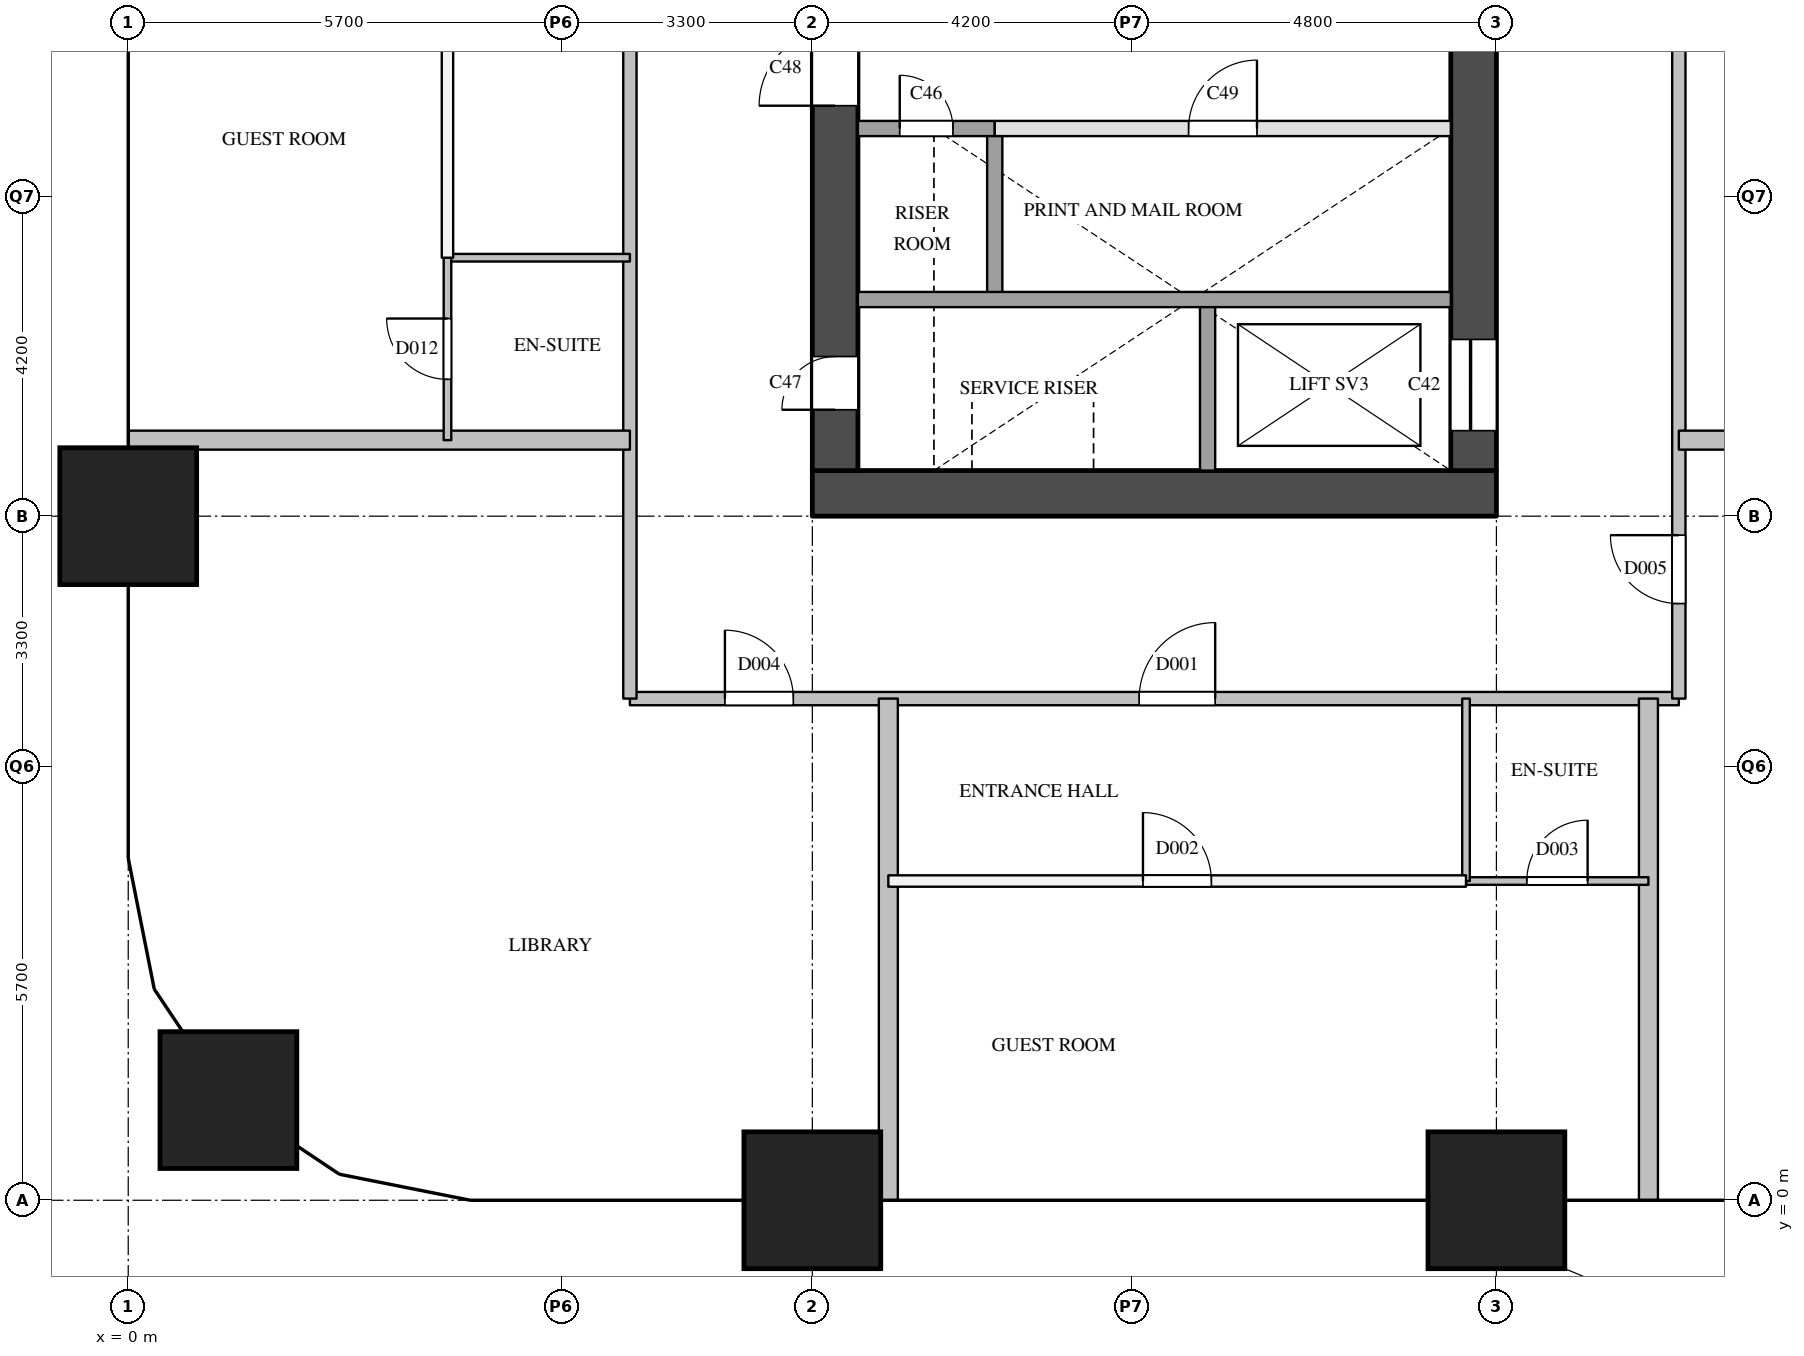
"""IFC4 building model, lengths in metres.
Left out: names, types, materials, properties, quantities, classifications, styles, units other than length and angle.
Written with IfcOpenShell. Run it as: python <this file> out.ifc"""

import sys

from ifc_helpers import new_model, si_unit, direction, frame, frame_2d, origin, origin_2d, place, context, subcontext, project, spatial, rectangle, extrude, element, fill, save


model = new_model("IFC4")
c1 = context("Model", 3, precision=1e-05, world=origin(), true_north=direction((0.0, 1.0)))
c2 = subcontext(c1, "Body", "Model", "MODEL_VIEW")
j1 = project(units=[si_unit("LENGTHUNIT", "METRE"), si_unit("PLANEANGLEUNIT", "RADIAN")], contexts=[c1])
p1 = place(None, origin())
s1 = spatial("IfcSite", under=j1, at=p1, CompositionType="ELEMENT")
p2 = place(p1, origin())
s2 = spatial("IfcBuilding", under=s1, at=p2, CompositionType="ELEMENT")
p3 = place(p2, frame((0.0, 0.0, 50.0)))
s3 = spatial("IfcBuildingStorey", under=s2, at=p3, CompositionType="ELEMENT", Elevation=50.0)
for number, where, z_axis, x_axis in (
    (1, (1.318, 1.318, 0.0), (0.0, 0.0, 1.0), (1.0, 0.0, 0.0)),
    (2, (0.0, 9.0, 0.0), (0.0, 0.0, 1.0), (1.0, 0.0, 0.0)),
    (3, (9.0, 0.0, 0.0), (0.0, 0.0, 1.0), (1.0, 0.0, 0.0)),
    (4, (18.0, 0.0, 0.0), (0.0, 0.0, 1.0), (1.0, 0.0, 0.0)),
):
    element("IfcColumn", number, at=place(p3, frame(where, z_axis=z_axis, x_axis=x_axis)), inside=s3, PredefinedType="COLUMN", context=c2, shape_type="SweptSolid", body=[
        extrude(rectangle(XDim=1.8, YDim=1.8, at=origin_2d()), origin(), (0.0, 0.0, 1.0), 3.8),
    ])
p4 = place(p3, frame((9.0, 9.3, 0.0), z_axis=(0.0, 0.0, 1.0), x_axis=(1.0, 0.0, 0.0)))
e5 = element("IfcWall", 5, at=p4, inside=s3, PredefinedType="SHEAR", context=c2, shape_type="SweptSolid", body=[
    extrude(rectangle(XDim=9.0, YDim=0.6, at=frame_2d((4.5, 0.0))), origin(), (0.0, 0.0, 1.0), 3.5),
])
p5 = place(p3, frame((9.3, 9.6, 0.0), z_axis=(0.0, 0.0, 1.0), x_axis=(0.0, 1.0, 0.0)))
e6 = element("IfcWall", 6, at=p5, inside=s3, PredefinedType="SHEAR", context=c2, shape_type="SweptSolid", body=[
    extrude(rectangle(XDim=12.3, YDim=0.6, at=frame_2d((6.15, 0.0))), origin(), (0.0, 0.0, 1.0), 3.5),
])
p6 = place(p5, frame((0.8, 0.0, 0.0)))
e7 = element("IfcOpeningElement", 7, at=p6, cuts=e6, PredefinedType="OPENING", context=c2, shape_type="SweptSolid", body=[
    extrude(rectangle(XDim=0.7, YDim=2.1, at=frame_2d((0.35, 1.05))), frame((0.0, 0.31, 0.0), z_axis=(0.0, -1.0, 0.0), x_axis=(1.0, 0.0, 0.0)), (0.0, 0.0, 1.0), 0.62),
])
p7 = place(p5, frame((4.8, 0.0, 0.0)))
e8 = element("IfcOpeningElement", 8, at=p7, cuts=e6, PredefinedType="OPENING", context=c2, shape_type="SweptSolid", body=[
    extrude(rectangle(XDim=1.0, YDim=2.1, at=frame_2d((0.5, 1.05))), frame((0.0, 0.31, 0.0), z_axis=(0.0, -1.0, 0.0), x_axis=(1.0, 0.0, 0.0)), (0.0, 0.0, 1.0), 0.62),
])
p8 = place(p3, frame((17.7, 9.6, 0.0), z_axis=(0.0, 0.0, 1.0), x_axis=(0.0, 1.0, 0.0)))
e9 = element("IfcWall", 9, at=p8, inside=s3, PredefinedType="SHEAR", context=c2, shape_type="SweptSolid", body=[
    extrude(rectangle(XDim=12.3, YDim=0.6, at=frame_2d((6.15, 0.0))), origin(), (0.0, 0.0, 1.0), 3.5),
])
p9 = place(p8, frame((0.525, 0.0, 0.0)))
e10 = element("IfcOpeningElement", 10, at=p9, cuts=e9, PredefinedType="OPENING", context=c2, shape_type="SweptSolid", body=[
    extrude(rectangle(XDim=1.2, YDim=2.1, at=frame_2d((0.6, 1.05))), frame((0.0, 0.31, 0.0), z_axis=(0.0, -1.0, 0.0), x_axis=(1.0, 0.0, 0.0)), (0.0, 0.0, 1.0), 0.62),
])
p10 = place(p3, frame((11.4, 11.9, 0.0), z_axis=(0.0, 0.0, 1.0), x_axis=(0.0, 1.0, 0.0)))
e11 = element("IfcWall", 11, at=p10, inside=s3, PredefinedType="SOLIDWALL", context=c2, shape_type="SweptSolid", body=[
    extrude(rectangle(XDim=2.2, YDim=0.2, at=frame_2d((1.1, 0.0))), origin(), (0.0, 0.0, 1.0), 3.5),
])
p11 = place(p3, frame((14.2, 9.6, 0.0), z_axis=(0.0, 0.0, 1.0), x_axis=(0.0, 1.0, 0.0)))
e12 = element("IfcWall", 12, at=p11, inside=s3, PredefinedType="SOLIDWALL", context=c2, shape_type="SweptSolid", body=[
    extrude(rectangle(XDim=2.3, YDim=0.2, at=frame_2d((1.15, 0.0))), origin(), (0.0, 0.0, 1.0), 3.5),
])
p12 = place(p3, frame((9.6, 11.85, 0.0), z_axis=(0.0, 0.0, 1.0), x_axis=(1.0, 0.0, 0.0)))
e13 = element("IfcWall", 13, at=p12, inside=s3, PredefinedType="SOLIDWALL", context=c2, shape_type="SweptSolid", body=[
    extrude(rectangle(XDim=7.8, YDim=0.2, at=frame_2d((3.9, 0.0))), origin(), (0.0, 0.0, 1.0), 3.5),
])
p13 = place(p3, frame((11.4, 14.1, 0.0), z_axis=(0.0, 0.0, 1.0), x_axis=(1.0, 0.0, 0.0)))
e14 = element("IfcWall", 14, at=p13, inside=s3, PredefinedType="PARTITIONING", context=c2, shape_type="SweptSolid", body=[
    extrude(rectangle(XDim=6.0, YDim=0.2, at=frame_2d((3.0, 0.0))), origin(), (0.0, 0.0, 1.0), 3.5),
])
p14 = place(p13, frame((2.55, 0.0, 0.0)))
e15 = element("IfcOpeningElement", 15, at=p14, cuts=e14, PredefinedType="OPENING", context=c2, shape_type="SweptSolid", body=[
    extrude(rectangle(XDim=0.9, YDim=2.1, at=frame_2d((0.45, 1.05))), frame((0.0, 0.11, 0.0), z_axis=(0.0, -1.0, 0.0), x_axis=(1.0, 0.0, 0.0)), (0.0, 0.0, 1.0), 0.22),
])
p15 = place(p3, frame((9.6, 14.1, 0.0), z_axis=(0.0, 0.0, 1.0), x_axis=(1.0, 0.0, 0.0)))
e16 = element("IfcWall", 16, at=p15, inside=s3, PredefinedType="SOLIDWALL", context=c2, shape_type="SweptSolid", body=[
    extrude(rectangle(XDim=1.8, YDim=0.2, at=frame_2d((0.9, 0.0))), origin(), (0.0, 0.0, 1.0), 3.5),
])
p16 = place(p15, frame((0.55, 0.0, 0.0)))
e17 = element("IfcOpeningElement", 17, at=p16, cuts=e16, PredefinedType="OPENING", context=c2, shape_type="SweptSolid", body=[
    extrude(rectangle(XDim=0.7, YDim=2.1, at=frame_2d((0.35, 1.05))), frame((0.0, 0.11, 0.0), z_axis=(0.0, -1.0, 0.0), x_axis=(1.0, 0.0, 0.0)), (0.0, 0.0, 1.0), 0.22),
])
p17 = place(p3, frame((6.6, 6.6, 0.0), z_axis=(0.0, 0.0, 1.0), x_axis=(1.0, 0.0, 0.0)))
e18 = element("IfcWall", 18, at=p17, inside=s3, PredefinedType="PARTITIONING", context=c2, shape_type="SweptSolid", body=[
    extrude(rectangle(XDim=13.8, YDim=0.175, at=frame_2d((6.9, 0.0))), origin(), (0.0, 0.0, 1.0), 3.5),
])
p18 = place(p17, frame((6.7, 0.0, 0.0)))
e19 = element("IfcOpeningElement", 19, at=p18, cuts=e18, PredefinedType="OPENING", context=c2, shape_type="SweptSolid", body=[
    extrude(rectangle(XDim=1.0, YDim=2.1, at=frame_2d((0.5, 1.05))), frame((0.0, 0.097, 0.0), z_axis=(0.0, -1.0, 0.0), x_axis=(1.0, 0.0, 0.0)), (0.0, 0.0, 1.0), 0.195),
])
p19 = place(p17, frame((1.25, 0.0, 0.0)))
e20 = element("IfcOpeningElement", 20, at=p19, cuts=e18, PredefinedType="OPENING", context=c2, shape_type="SweptSolid", body=[
    extrude(rectangle(XDim=0.9, YDim=2.1, at=frame_2d((0.45, 1.05))), frame((0.0, 0.097, 0.0), z_axis=(0.0, -1.0, 0.0), x_axis=(1.0, 0.0, 0.0)), (0.0, 0.0, 1.0), 0.195),
])
p20 = place(p3, frame((6.6, 6.6, 0.0), z_axis=(0.0, 0.0, 1.0), x_axis=(0.0, 1.0, 0.0)))
e21 = element("IfcWall", 21, at=p20, inside=s3, PredefinedType="PARTITIONING", context=c2, shape_type="SweptSolid", body=[
    extrude(rectangle(XDim=18.3, YDim=0.175, at=frame_2d((9.15, 0.0))), origin(), (0.0, 0.0, 1.0), 3.5),
])
p21 = place(p20, frame((9.1, 0.0, 0.0)))
e22 = element("IfcOpeningElement", 22, at=p21, cuts=e21, PredefinedType="OPENING", context=c2, shape_type="SweptSolid", body=[
    extrude(rectangle(XDim=1.0, YDim=2.1, at=frame_2d((0.5, 1.05))), frame((0.0, 0.097, 0.0), z_axis=(0.0, -1.0, 0.0), x_axis=(1.0, 0.0, 0.0)), (0.0, 0.0, 1.0), 0.195),
])
p22 = place(p20, frame((16.55, 0.0, 0.0)))
e23 = element("IfcOpeningElement", 23, at=p22, cuts=e21, PredefinedType="OPENING", context=c2, shape_type="SweptSolid", body=[
    extrude(rectangle(XDim=1.0, YDim=2.1, at=frame_2d((0.5, 1.05))), frame((0.0, 0.097, 0.0), z_axis=(0.0, -1.0, 0.0), x_axis=(1.0, 0.0, 0.0)), (0.0, 0.0, 1.0), 0.195),
])
p23 = place(p3, frame((20.4, 6.6, 0.0), z_axis=(0.0, 0.0, 1.0), x_axis=(0.0, 1.0, 0.0)))
e24 = element("IfcWall", 24, at=p23, inside=s3, PredefinedType="PARTITIONING", context=c2, shape_type="SweptSolid", body=[
    extrude(rectangle(XDim=12.65, YDim=0.175, at=frame_2d((6.325, 0.0))), origin(), (0.0, 0.0, 1.0), 3.5),
])
p24 = place(p23, frame((1.25, 0.0, 0.0)))
e25 = element("IfcOpeningElement", 25, at=p24, cuts=e24, PredefinedType="OPENING", context=c2, shape_type="SweptSolid", body=[
    extrude(rectangle(XDim=0.9, YDim=2.1, at=frame_2d((0.45, 1.05))), frame((0.0, 0.097, 0.0), z_axis=(0.0, -1.0, 0.0), x_axis=(1.0, 0.0, 0.0)), (0.0, 0.0, 1.0), 0.195),
])
p25 = place(p3, frame((10.0, 4.2, 0.0), z_axis=(0.0, 0.0, 1.0), x_axis=(1.0, 0.0, 0.0)))
e26 = element("IfcWall", 26, at=p25, inside=s3, PredefinedType="PARTITIONING", context=c2, shape_type="SweptSolid", body=[
    extrude(rectangle(XDim=7.6, YDim=0.15, at=frame_2d((3.8, 0.0))), origin(), (0.0, 0.0, 1.0), 3.5),
])
p26 = place(p25, frame((3.35, 0.0, 0.0)))
e27 = element("IfcOpeningElement", 27, at=p26, cuts=e26, PredefinedType="OPENING", context=c2, shape_type="SweptSolid", body=[
    extrude(rectangle(XDim=0.9, YDim=2.1, at=frame_2d((0.45, 1.05))), frame((0.0, 0.085, 0.0), z_axis=(0.0, -1.0, 0.0), x_axis=(1.0, 0.0, 0.0)), (0.0, 0.0, 1.0), 0.17),
])
p27 = place(p3, frame((4.2, 12.4, 0.0), z_axis=(0.0, 0.0, 1.0), x_axis=(0.0, 1.0, 0.0)))
e28 = element("IfcWall", 28, at=p27, inside=s3, PredefinedType="PARTITIONING", context=c2, shape_type="SweptSolid", body=[
    extrude(rectangle(XDim=7.6, YDim=0.15, at=frame_2d((3.8, 0.0))), origin(), (0.0, 0.0, 1.0), 3.5),
])
p28 = place(p27, frame((3.35, 0.0, 0.0)))
e29 = element("IfcOpeningElement", 29, at=p28, cuts=e28, PredefinedType="OPENING", context=c2, shape_type="SweptSolid", body=[
    extrude(rectangle(XDim=0.9, YDim=2.1, at=frame_2d((0.45, 1.05))), frame((0.0, 0.085, 0.0), z_axis=(0.0, -1.0, 0.0), x_axis=(1.0, 0.0, 0.0)), (0.0, 0.0, 1.0), 0.17),
])
p29 = place(p3, frame((0.0, 10.0, 0.0), z_axis=(0.0, 0.0, 1.0), x_axis=(1.0, 0.0, 0.0)))
e30 = element("IfcWall", 30, at=p29, inside=s3, PredefinedType="PARTITIONING", context=c2, shape_type="SweptSolid", body=[
    extrude(rectangle(XDim=6.6, YDim=0.25, at=frame_2d((3.3, 0.0))), origin(), (0.0, 0.0, 1.0), 2.5),
])
p30 = place(p3, frame((20.4, 10.0, 0.0), z_axis=(0.0, 0.0, 1.0), x_axis=(1.0, 0.0, 0.0)))
e31 = element("IfcWall", 31, at=p30, inside=s3, PredefinedType="PARTITIONING", context=c2, shape_type="SweptSolid", body=[
    extrude(rectangle(XDim=9.6, YDim=0.25, at=frame_2d((4.8, 0.0))), origin(), (0.0, 0.0, 1.0), 2.5),
])
for number, where, z_axis, x_axis in (
    (32, (10.0, 0.0, 0.0), (0.0, 0.0, 1.0), (0.0, 1.0, 0.0)),
    (33, (20.0, 0.0, 0.0), (0.0, 0.0, 1.0), (0.0, 1.0, 0.0)),
):
    element("IfcWall", number, at=place(p3, frame(where, z_axis=z_axis, x_axis=x_axis)), inside=s3, PredefinedType="PARTITIONING", context=c2, shape_type="SweptSolid", body=[
        extrude(rectangle(XDim=6.6, YDim=0.25, at=frame_2d((3.3, 0.0))), origin(), (0.0, 0.0, 1.0), 2.5),
    ])
p31 = place(p3, frame((17.6, 4.2, 0.0), z_axis=(0.0, 0.0, 1.0), x_axis=(1.0, 0.0, 0.0)))
e34 = element("IfcWall", 34, at=p31, inside=s3, PredefinedType="PARTITIONING", context=c2, shape_type="SweptSolid", body=[
    extrude(rectangle(XDim=2.4, YDim=0.1, at=frame_2d((1.2, 0.0))), origin(), (0.0, 0.0, 1.0), 3.5),
])
p32 = place(p31, frame((0.8, 0.0, 0.0)))
e35 = element("IfcOpeningElement", 35, at=p32, cuts=e34, PredefinedType="OPENING", context=c2, shape_type="SweptSolid", body=[
    extrude(rectangle(XDim=0.8, YDim=2.1, at=frame_2d((0.4, 1.05))), frame((0.0, 0.06, 0.0), z_axis=(0.0, -1.0, 0.0), x_axis=(1.0, 0.0, 0.0)), (0.0, 0.0, 1.0), 0.12),
])
p33 = place(p3, frame((4.2, 12.4, 0.0), z_axis=(0.0, 0.0, 1.0), x_axis=(1.0, 0.0, 0.0)))
e36 = element("IfcWall", 36, at=p33, inside=s3, PredefinedType="PARTITIONING", context=c2, shape_type="SweptSolid", body=[
    extrude(rectangle(XDim=2.4, YDim=0.1, at=frame_2d((1.2, 0.0))), origin(), (0.0, 0.0, 1.0), 3.5),
])
p34 = place(p3, frame((4.2, 10.0, 0.0), z_axis=(0.0, 0.0, 1.0), x_axis=(0.0, 1.0, 0.0)))
e37 = element("IfcWall", 37, at=p34, inside=s3, PredefinedType="PARTITIONING", context=c2, shape_type="SweptSolid", body=[
    extrude(rectangle(XDim=2.4, YDim=0.1, at=frame_2d((1.2, 0.0))), origin(), (0.0, 0.0, 1.0), 3.5),
])
p35 = place(p34, frame((0.8, 0.0, 0.0)))
e38 = element("IfcOpeningElement", 38, at=p35, cuts=e37, PredefinedType="OPENING", context=c2, shape_type="SweptSolid", body=[
    extrude(rectangle(XDim=0.8, YDim=2.1, at=frame_2d((0.4, 1.05))), frame((0.0, 0.06, 0.0), z_axis=(0.0, -1.0, 0.0), x_axis=(1.0, 0.0, 0.0)), (0.0, 0.0, 1.0), 0.12),
])
p36 = place(p3, frame((17.6, 4.2, 0.0), z_axis=(0.0, 0.0, 1.0), x_axis=(0.0, 1.0, 0.0)))
e39 = element("IfcWall", 39, at=p36, inside=s3, PredefinedType="PARTITIONING", context=c2, shape_type="SweptSolid", body=[
    extrude(rectangle(XDim=2.4, YDim=0.1, at=frame_2d((1.2, 0.0))), origin(), (0.0, 0.0, 1.0), 3.5),
])
p37 = place(p9, origin())
e40 = element("IfcDoor", 40, at=p37, inside=s3, OperationType="SLIDING_TO_LEFT", PredefinedType="DOOR", context=c2, shape_type="SweptSolid", body=[
    extrude(rectangle(XDim=1.2, YDim=2.1, at=frame_2d((0.6, 1.05))), frame((0.0, 0.025, 0.0), z_axis=(0.0, -1.0, 0.0), x_axis=(1.0, 0.0, 0.0)), (0.0, 0.0, 1.0), 0.05),
])
fill(e10, e40)
p38 = place(p16, origin())
e41 = element("IfcDoor", 41, at=p38, inside=s3, OperationType="SINGLE_SWING_LEFT", PredefinedType="DOOR", context=c2, shape_type="SweptSolid", body=[
    extrude(rectangle(XDim=0.7, YDim=2.1, at=frame_2d((0.35, 1.05))), frame((0.0, 0.025, 0.0), z_axis=(0.0, -1.0, 0.0), x_axis=(1.0, 0.0, 0.0)), (0.0, 0.0, 1.0), 0.05),
])
fill(e17, e41)
p39 = place(p6, origin())
e42 = element("IfcDoor", 42, at=p39, inside=s3, OperationType="SINGLE_SWING_LEFT", PredefinedType="DOOR", context=c2, shape_type="SweptSolid", body=[
    extrude(rectangle(XDim=0.7, YDim=2.1, at=frame_2d((0.35, 1.05))), frame((0.0, 0.025, 0.0), z_axis=(0.0, -1.0, 0.0), x_axis=(1.0, 0.0, 0.0)), (0.0, 0.0, 1.0), 0.05),
])
fill(e7, e42)
p40 = place(p7, origin())
e43 = element("IfcDoor", 43, at=p40, inside=s3, OperationType="SINGLE_SWING_LEFT", PredefinedType="DOOR", context=c2, shape_type="SweptSolid", body=[
    extrude(rectangle(XDim=1.0, YDim=2.1, at=frame_2d((0.5, 1.05))), frame((0.0, 0.025, 0.0), z_axis=(0.0, -1.0, 0.0), x_axis=(1.0, 0.0, 0.0)), (0.0, 0.0, 1.0), 0.05),
])
fill(e8, e43)
p41 = place(p14, origin())
e44 = element("IfcDoor", 44, at=p41, inside=s3, OperationType="SINGLE_SWING_RIGHT", PredefinedType="DOOR", context=c2, shape_type="SweptSolid", body=[
    extrude(rectangle(XDim=0.9, YDim=2.1, at=frame_2d((0.45, 1.05))), frame((0.0, 0.025, 0.0), z_axis=(0.0, -1.0, 0.0), x_axis=(1.0, 0.0, 0.0)), (0.0, 0.0, 1.0), 0.05),
])
fill(e15, e44)
p42 = place(p18, origin())
e45 = element("IfcDoor", 45, at=p42, inside=s3, OperationType="SINGLE_SWING_RIGHT", PredefinedType="DOOR", context=c2, shape_type="SweptSolid", body=[
    extrude(rectangle(XDim=1.0, YDim=2.1, at=frame_2d((0.5, 1.05))), frame((0.0, 0.025, 0.0), z_axis=(0.0, -1.0, 0.0), x_axis=(1.0, 0.0, 0.0)), (0.0, 0.0, 1.0), 0.05),
])
fill(e19, e45)
p43 = place(p26, origin())
e46 = element("IfcDoor", 46, at=p43, inside=s3, OperationType="SINGLE_SWING_LEFT", PredefinedType="DOOR", context=c2, shape_type="SweptSolid", body=[
    extrude(rectangle(XDim=0.9, YDim=2.1, at=frame_2d((0.45, 1.05))), frame((0.0, 0.025, 0.0), z_axis=(0.0, -1.0, 0.0), x_axis=(1.0, 0.0, 0.0)), (0.0, 0.0, 1.0), 0.05),
])
fill(e27, e46)
p44 = place(p32, origin())
e47 = element("IfcDoor", 47, at=p44, inside=s3, OperationType="SINGLE_SWING_RIGHT", PredefinedType="DOOR", context=c2, shape_type="SweptSolid", body=[
    extrude(rectangle(XDim=0.8, YDim=2.1, at=frame_2d((0.4, 1.05))), frame((0.0, 0.025, 0.0), z_axis=(0.0, -1.0, 0.0), x_axis=(1.0, 0.0, 0.0)), (0.0, 0.0, 1.0), 0.05),
])
fill(e35, e47)
p45 = place(p19, origin())
e48 = element("IfcDoor", 48, at=p45, inside=s3, OperationType="SINGLE_SWING_LEFT", PredefinedType="DOOR", context=c2, shape_type="SweptSolid", body=[
    extrude(rectangle(XDim=0.9, YDim=2.1, at=frame_2d((0.45, 1.05))), frame((0.0, 0.025, 0.0), z_axis=(0.0, -1.0, 0.0), x_axis=(1.0, 0.0, 0.0)), (0.0, 0.0, 1.0), 0.05),
])
fill(e20, e48)
p46 = place(p24, origin())
e49 = element("IfcDoor", 49, at=p46, inside=s3, OperationType="SINGLE_SWING_RIGHT", PredefinedType="DOOR", context=c2, shape_type="SweptSolid", body=[
    extrude(rectangle(XDim=0.9, YDim=2.1, at=frame_2d((0.45, 1.05))), frame((0.0, 0.025, 0.0), z_axis=(0.0, -1.0, 0.0), x_axis=(1.0, 0.0, 0.0)), (0.0, 0.0, 1.0), 0.05),
])
fill(e25, e49)
p47 = place(p35, origin())
e50 = element("IfcDoor", 50, at=p47, inside=s3, OperationType="SINGLE_SWING_RIGHT", PredefinedType="DOOR", context=c2, shape_type="SweptSolid", body=[
    extrude(rectangle(XDim=0.8, YDim=2.1, at=frame_2d((0.4, 1.05))), frame((0.0, 0.025, 0.0), z_axis=(0.0, -1.0, 0.0), x_axis=(1.0, 0.0, 0.0)), (0.0, 0.0, 1.0), 0.05),
])
fill(e38, e50)
save(model, sys.argv[1])
